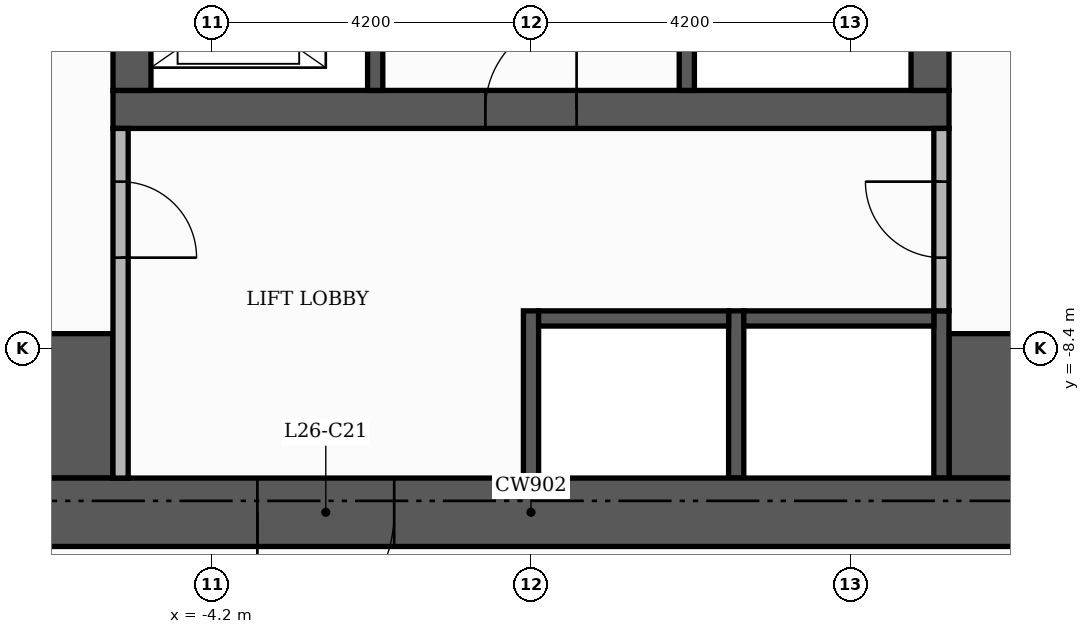
"""IFC4 building model, lengths in metres.
Left out: names, types, materials, properties, quantities, classifications, styles, units other than length and angle.
Written with IfcOpenShell. Run it as: python <this file> out.ifc"""

import sys

from ifc_helpers import new_model, si_unit, direction, frame, frame_2d, origin, place, context, subcontext, project, spatial, rectangle, extrude, element, fill, save


model = new_model("IFC4")
c1 = context("Model", 3, precision=1e-05, world=origin(), true_north=direction((0.0, 1.0)))
c2 = subcontext(c1, "Body", "Model", "MODEL_VIEW")
j1 = project(units=[si_unit("LENGTHUNIT", "METRE"), si_unit("PLANEANGLEUNIT", "RADIAN")], contexts=[c1])
p1 = place(None, origin())
s1 = spatial("IfcSite", under=j1, at=p1, CompositionType="ELEMENT")
p2 = place(p1, origin())
s2 = spatial("IfcBuilding", under=s1, at=p2, CompositionType="ELEMENT")
p3 = place(p2, frame((0.0, 0.0, 110.4)))
s3 = spatial("IfcBuildingStorey", under=s2, at=p3, CompositionType="ELEMENT", Elevation=110.4)
p4 = place(p3, frame((-5.5, -5.25, 0.0), z_axis=(0.0, 0.0, 1.0), x_axis=(1.0, 0.0, 0.0)))
e1 = element("IfcWall", 1, at=p4, inside=s3, PredefinedType="SHEAR", context=c2, shape_type="SweptSolid", body=[
    extrude(rectangle(XDim=11.0, YDim=0.5, at=frame_2d((5.5, 0.0))), origin(), (0.0, 0.0, 1.0), 3.48),
])
p5 = place(p4, frame((4.9, 0.0, 0.0)))
e2 = element("IfcOpeningElement", 2, at=p5, cuts=e1, PredefinedType="OPENING", context=c2, shape_type="SweptSolid", body=[
    extrude(rectangle(XDim=1.2, YDim=2.1, at=frame_2d((0.6, 1.05))), frame((0.0, 0.26, 0.0), z_axis=(0.0, -1.0, 0.0), x_axis=(1.0, 0.0, 0.0)), (0.0, 0.0, 1.0), 0.52),
])
for number, where, z_axis, x_axis in (
    (3, (-5.25, -5.0, 0.0), (0.0, 0.0, 1.0), (0.0, 1.0, 0.0)),
    (4, (5.25, -5.0, 0.0), (0.0, 0.0, 1.0), (0.0, 1.0, 0.0)),
):
    element("IfcWall", number, at=place(p3, frame(where, z_axis=z_axis, x_axis=x_axis)), inside=s3, PredefinedType="SHEAR", context=c2, shape_type="SweptSolid", body=[
        extrude(rectangle(XDim=10.5, YDim=0.5, at=frame_2d((5.25, 0.0))), origin(), (0.0, 0.0, 1.0), 3.48),
    ])
for number, where, z_axis, x_axis in (
    (5, (-10.1, -9.15, 0.0), (0.0, 0.0, 1.0), (1.0, 0.0, 0.0)),
    (6, (5.5, -9.15, 0.0), (0.0, 0.0, 1.0), (1.0, 0.0, 0.0)),
):
    element("IfcWall", number, at=place(p3, frame(where, z_axis=z_axis, x_axis=x_axis)), inside=s3, PredefinedType="SHEAR", context=c2, shape_type="SweptSolid", body=[
        extrude(rectangle(XDim=4.6, YDim=1.9, at=frame_2d((2.3, 0.0))), origin(), (0.0, 0.0, 1.0), 3.48),
    ])
p6 = place(p3, frame((2.05, -5.0, 0.0), z_axis=(0.0, 0.0, 1.0), x_axis=(0.0, 1.0, 0.0)))
e7 = element("IfcWall", 7, at=p6, inside=s3, PredefinedType="SHEAR", context=c2, shape_type="SweptSolid", body=[
    extrude(rectangle(XDim=6.6, YDim=0.2, at=frame_2d((3.3, 0.0))), origin(), (0.0, 0.0, 1.0), 3.48),
])
p7 = place(p6, frame((5.25, 0.0, 0.0)))
e8 = element("IfcOpeningElement", 8, at=p7, cuts=e7, PredefinedType="OPENING", context=c2, shape_type="SweptSolid", body=[
    extrude(rectangle(XDim=1.0, YDim=2.1, at=frame_2d((0.5, 1.05))), frame((0.0, 0.11, 0.0), z_axis=(0.0, -1.0, 0.0), x_axis=(1.0, 0.0, 0.0)), (0.0, 0.0, 1.0), 0.22),
])
for number, where, z_axis, x_axis in (
    (9, (0.0, -10.1, 0.0), (0.0, 0.0, 1.0), (0.0, 1.0, 0.0)),
    (10, (2.7, -10.1, 0.0), (0.0, 0.0, 1.0), (0.0, 1.0, 0.0)),
    (11, (5.4, -10.1, 0.0), (0.0, 0.0, 1.0), (0.0, 1.0, 0.0)),
):
    element("IfcWall", number, at=place(p3, frame(where, z_axis=z_axis, x_axis=x_axis)), inside=s3, PredefinedType="SHEAR", context=c2, shape_type="SweptSolid", body=[
        extrude(rectangle(XDim=2.2, YDim=0.2, at=frame_2d((1.1, 0.0))), origin(), (0.0, 0.0, 1.0), 3.48),
    ])
for number, where, z_axis, x_axis in (
    (12, (0.1, -8.0, 0.0), (0.0, 0.0, 1.0), (1.0, 0.0, 0.0)),
    (13, (2.8, -8.0, 0.0), (0.0, 0.0, 1.0), (1.0, 0.0, 0.0)),
):
    element("IfcWall", number, at=place(p3, frame(where, z_axis=z_axis, x_axis=x_axis)), inside=s3, PredefinedType="SHEAR", context=c2, shape_type="SweptSolid", body=[
        extrude(rectangle(XDim=2.5, YDim=0.2, at=frame_2d((1.25, 0.0))), origin(), (0.0, 0.0, 1.0), 3.48),
    ])
p8 = place(p3, frame((-2.05, -5.0, 0.0), z_axis=(0.0, 0.0, 1.0), x_axis=(0.0, 1.0, 0.0)))
e14 = element("IfcWall", 14, at=p8, inside=s3, PredefinedType="SHEAR", context=c2, shape_type="SweptSolid", body=[
    extrude(rectangle(XDim=3.4, YDim=0.2, at=frame_2d((1.7, 0.0))), origin(), (0.0, 0.0, 1.0), 3.48),
])
p9 = place(p8, frame((0.55, 0.0, 0.0)))
e15 = element("IfcOpeningElement", 15, at=p9, cuts=e14, PredefinedType="OPENING", context=c2, shape_type="SweptSolid", body=[
    extrude(rectangle(XDim=1.1, YDim=2.1, at=frame_2d((0.55, 1.05))), frame((0.0, 0.11, 0.0), z_axis=(0.0, -1.0, 0.0), x_axis=(1.0, 0.0, 0.0)), (0.0, 0.0, 1.0), 0.22),
])
p10 = place(p8, frame((2.45, 0.0, 0.0)))
e16 = element("IfcOpeningElement", 16, at=p10, cuts=e14, PredefinedType="OPENING", context=c2, shape_type="SweptSolid", body=[
    extrude(rectangle(XDim=0.8, YDim=2.1, at=frame_2d((0.4, 1.05))), frame((0.0, 0.11, 0.0), z_axis=(0.0, -1.0, 0.0), x_axis=(1.0, 0.0, 0.0)), (0.0, 0.0, 1.0), 0.22),
])
p11 = place(p3, frame((-11.0, -10.55, 0.0), z_axis=(0.0, 0.0, 1.0), x_axis=(1.0, 0.0, 0.0)))
e17 = element("IfcWall", 17, at=p11, inside=s3, PredefinedType="SHEAR", context=c2, shape_type="SweptSolid", body=[
    extrude(rectangle(XDim=22.0, YDim=0.9, at=frame_2d((11.0, 0.0))), origin(), (0.0, 0.0, 1.0), 3.48),
])
p12 = place(p11, frame((7.4, 0.0, 0.0)))
e18 = element("IfcOpeningElement", 18, at=p12, cuts=e17, PredefinedType="OPENING", context=c2, shape_type="SweptSolid", body=[
    extrude(rectangle(XDim=1.8, YDim=2.2, at=frame_2d((0.9, 1.1))), frame((0.0, 0.46, 0.0), z_axis=(0.0, -1.0, 0.0), x_axis=(1.0, 0.0, 0.0)), (0.0, 0.0, 1.0), 0.92),
])
p13 = place(p3, frame((-5.4, -10.1, 0.0), z_axis=(0.0, 0.0, 1.0), x_axis=(0.0, 1.0, 0.0)))
e19 = element("IfcWall", 19, at=p13, inside=s3, PredefinedType="PARTITIONING", context=c2, shape_type="SweptSolid", body=[
    extrude(rectangle(XDim=4.6, YDim=0.2, at=frame_2d((2.3, 0.0))), origin(), (0.0, 0.0, 1.0), 3.48),
])
p14 = place(p13, frame((2.9, 0.0, 0.0)))
e20 = element("IfcOpeningElement", 20, at=p14, cuts=e19, PredefinedType="OPENING", context=c2, shape_type="SweptSolid", body=[
    extrude(rectangle(XDim=1.0, YDim=2.1, at=frame_2d((0.5, 1.05))), frame((0.0, 0.11, 0.0), z_axis=(0.0, -1.0, 0.0), x_axis=(1.0, 0.0, 0.0)), (0.0, 0.0, 1.0), 0.22),
])
p15 = place(p3, frame((5.4, -7.9, 0.0), z_axis=(0.0, 0.0, 1.0), x_axis=(0.0, 1.0, 0.0)))
e21 = element("IfcWall", 21, at=p15, inside=s3, PredefinedType="PARTITIONING", context=c2, shape_type="SweptSolid", body=[
    extrude(rectangle(XDim=2.4, YDim=0.2, at=frame_2d((1.2, 0.0))), origin(), (0.0, 0.0, 1.0), 3.48),
])
p16 = place(p15, frame((0.7, 0.0, 0.0)))
e22 = element("IfcOpeningElement", 22, at=p16, cuts=e21, PredefinedType="OPENING", context=c2, shape_type="SweptSolid", body=[
    extrude(rectangle(XDim=1.0, YDim=2.1, at=frame_2d((0.5, 1.05))), frame((0.0, 0.11, 0.0), z_axis=(0.0, -1.0, 0.0), x_axis=(1.0, 0.0, 0.0)), (0.0, 0.0, 1.0), 0.22),
])
p17 = place(p5, origin())
e23 = element("IfcDoor", 23, at=p17, inside=s3, OperationType="SINGLE_SWING_RIGHT", PredefinedType="DOOR", context=c2, shape_type="SweptSolid", body=[
    extrude(rectangle(XDim=1.2, YDim=2.1, at=frame_2d((0.6, 1.05))), frame((0.0, 0.025, 0.0), z_axis=(0.0, -1.0, 0.0), x_axis=(1.0, 0.0, 0.0)), (0.0, 0.0, 1.0), 0.05),
])
fill(e2, e23)
p18 = place(p14, frame((1.0, 0.0, 0.0), z_axis=(0.0, 0.0, 1.0), x_axis=(-1.0, 0.0, 0.0)))
e24 = element("IfcDoor", 24, at=p18, inside=s3, OperationType="SINGLE_SWING_LEFT", PredefinedType="DOOR", context=c2, shape_type="SweptSolid", body=[
    extrude(rectangle(XDim=1.0, YDim=2.1, at=frame_2d((0.5, 1.05))), frame((0.0, 0.025, 0.0), z_axis=(0.0, -1.0, 0.0), x_axis=(1.0, 0.0, 0.0)), (0.0, 0.0, 1.0), 0.05),
])
fill(e20, e24)
p19 = place(p16, origin())
e25 = element("IfcDoor", 25, at=p19, inside=s3, OperationType="SINGLE_SWING_RIGHT", PredefinedType="DOOR", context=c2, shape_type="SweptSolid", body=[
    extrude(rectangle(XDim=1.0, YDim=2.1, at=frame_2d((0.5, 1.05))), frame((0.0, 0.025, 0.0), z_axis=(0.0, -1.0, 0.0), x_axis=(1.0, 0.0, 0.0)), (0.0, 0.0, 1.0), 0.05),
])
fill(e22, e25)
p20 = place(p12, frame((1.8, 0.0, 0.0), z_axis=(0.0, 0.0, 1.0), x_axis=(-1.0, 0.0, 0.0)))
e26 = element("IfcDoor", 26, at=p20, inside=s3, OperationType="DOUBLE_DOOR_SINGLE_SWING", PredefinedType="DOOR", context=c2, shape_type="SweptSolid", body=[
    extrude(rectangle(XDim=1.8, YDim=2.2, at=frame_2d((0.9, 1.1))), frame((0.0, 0.025, 0.0), z_axis=(0.0, -1.0, 0.0), x_axis=(1.0, 0.0, 0.0)), (0.0, 0.0, 1.0), 0.05),
])
fill(e18, e26)
save(model, sys.argv[1])
